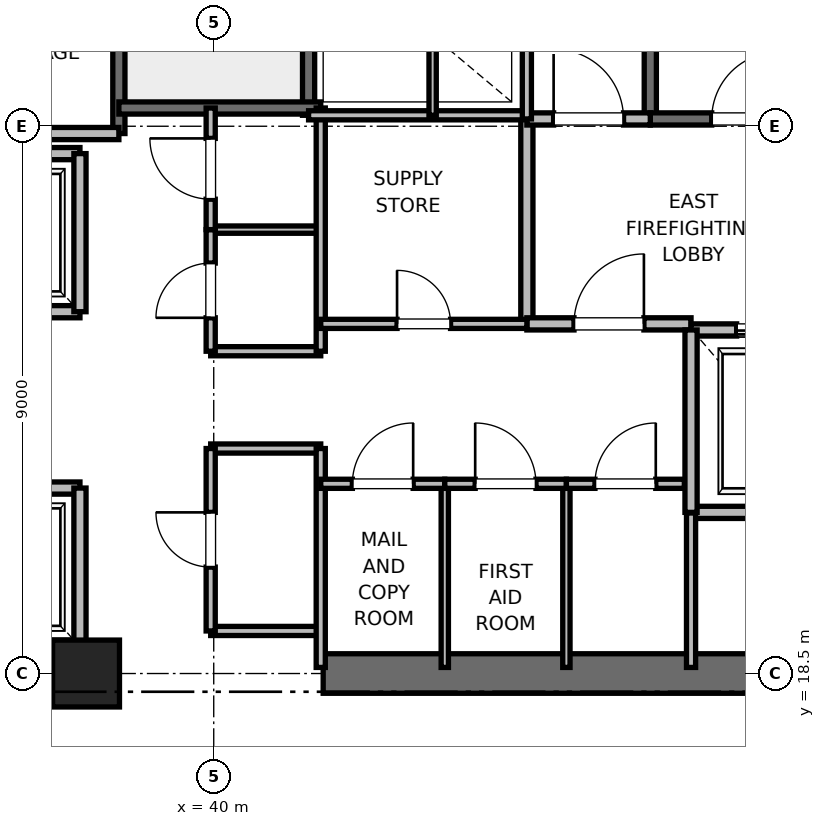
"""IFC4 building model, lengths in metres.
Left out: names, types, materials, properties, quantities, classifications, styles, units other than length and angle.
Written with IfcOpenShell. Run it as: python <this file> out.ifc"""

import sys

from ifc_helpers import new_model, si_unit, direction, frame, frame_2d, origin, origin_2d, place, context, subcontext, project, spatial, rectangle, extrude, element, fill, save


model = new_model("IFC4")
c1 = context("Model", 3, precision=1e-05, world=origin(), true_north=direction((0.0, 1.0)))
c2 = subcontext(c1, "Body", "Model", "MODEL_VIEW")
j1 = project(units=[si_unit("LENGTHUNIT", "METRE"), si_unit("PLANEANGLEUNIT", "RADIAN")], contexts=[c1])
p1 = place(None, origin())
s1 = spatial("IfcSite", under=j1, at=p1, CompositionType="ELEMENT")
p2 = place(p1, origin())
s2 = spatial("IfcBuilding", under=s1, at=p2, CompositionType="ELEMENT")
p3 = place(p2, frame((0.0, 0.0, 87.6)))
s3 = spatial("IfcBuildingStorey", under=s2, at=p3, CompositionType="ELEMENT", Elevation=87.6)
p4 = place(p3, frame((37.9, 18.5, 0.0), z_axis=(0.0, 0.0, 1.0), x_axis=(1.0, 0.0, 0.0)))
e1 = element("IfcColumn", 1, at=p4, inside=s3, PredefinedType="PILASTER", context=c2, shape_type="SweptSolid", body=[
    extrude(rectangle(XDim=1.1, YDim=1.1, at=origin_2d()), origin(), (0.0, 0.0, 1.0), 4.0),
])
for number, where, z_axis, x_axis in (
    (2, (29.0, 18.5, 0.0), (0.0, 0.0, 1.0), (1.0, 0.0, 0.0)),
    (3, (41.8, 18.5, 0.0), (0.0, 0.0, 1.0), (1.0, 0.0, 0.0)),
):
    element("IfcWall", number, at=place(p3, frame(where, z_axis=z_axis, x_axis=x_axis)), inside=s3, PredefinedType="SHEAR", context=c2, shape_type="SweptSolid", body=[
        extrude(rectangle(XDim=9.2, YDim=0.65, at=frame_2d((4.6, 0.0))), origin(), (0.0, 0.0, 1.0), 3.76),
    ])
p5 = place(p3, frame((47.18, 27.62, 0.0), z_axis=(0.0, 0.0, 1.0), x_axis=(0.0, 1.0, 0.0)))
e4 = element("IfcWall", 4, at=p5, inside=s3, PredefinedType="SOLIDWALL", context=c2, shape_type="SweptSolid", body=[
    extrude(rectangle(XDim=8.18, YDim=0.2, at=frame_2d((4.09, 0.0))), origin(), (0.0, 0.0, 1.0), 3.76),
])
p6 = place(p3, frame((47.18, 27.62, 0.0), z_axis=(0.0, 0.0, 1.0), x_axis=(1.0, 0.0, 0.0)))
e5 = element("IfcWall", 5, at=p6, inside=s3, PredefinedType="SOLIDWALL", context=c2, shape_type="SweptSolid", body=[
    extrude(rectangle(XDim=3.12, YDim=0.2, at=frame_2d((1.56, 0.0))), origin(), (0.0, 0.0, 1.0), 3.76),
])
p7 = place(p6, frame((1.01, 0.0, 0.0)))
e6 = element("IfcOpeningElement", 6, at=p7, cuts=e5, PredefinedType="OPENING", context=c2, shape_type="SweptSolid", body=[
    extrude(rectangle(XDim=1.1, YDim=2.15, at=frame_2d((0.55, 1.075))), frame((0.0, 0.1, 0.0), z_axis=(0.0, -1.0, 0.0), x_axis=(1.0, 0.0, 0.0)), (0.0, 0.0, 1.0), 0.2),
])
p8 = place(p3, frame((38.44, 27.38, 0.0), z_axis=(0.0, 0.0, 1.0), x_axis=(0.0, 1.0, 0.0)))
e7 = element("IfcWall", 7, at=p8, inside=s3, PredefinedType="SOLIDWALL", context=c2, shape_type="SweptSolid", body=[
    extrude(rectangle(XDim=8.87, YDim=0.2, at=frame_2d((4.435, 0.0))), origin(), (0.0, 0.0, 1.0), 3.76),
])
p9 = place(p3, frame((41.56, 27.68, 0.0), z_axis=(0.0, 0.0, 1.0), x_axis=(0.0, 1.0, 0.0)))
e8 = element("IfcWall", 8, at=p9, inside=s3, PredefinedType="SOLIDWALL", context=c2, shape_type="SweptSolid", body=[
    extrude(rectangle(XDim=8.57, YDim=0.2, at=frame_2d((4.285, 0.0))), origin(), (0.0, 0.0, 1.0), 3.76),
])
p10 = place(p3, frame((38.44, 27.8, 0.0), z_axis=(0.0, 0.0, 1.0), x_axis=(1.0, 0.0, 0.0)))
e9 = element("IfcWall", 9, at=p10, inside=s3, PredefinedType="SOLIDWALL", context=c2, shape_type="SweptSolid", body=[
    extrude(rectangle(XDim=3.32, YDim=0.2, at=frame_2d((1.66, 0.0))), origin(), (0.0, 0.0, 1.0), 3.76),
])
p11 = place(p3, frame((32.82, 27.38, 0.0), z_axis=(0.0, 0.0, 1.0), x_axis=(1.0, 0.0, 0.0)))
e10 = element("IfcWall", 10, at=p11, inside=s3, PredefinedType="PARTITIONING", context=c2, shape_type="SweptSolid", body=[
    extrude(rectangle(XDim=5.62, YDim=0.2, at=frame_2d((2.81, 0.0))), origin(), (0.0, 0.0, 1.0), 3.76),
])
p12 = place(p3, frame((45.15, 24.25, 0.0), z_axis=(0.0, 0.0, 1.0), x_axis=(0.0, 1.0, 0.0)))
e11 = element("IfcWall", 11, at=p12, inside=s3, PredefinedType="PARTITIONING", context=c2, shape_type="SweptSolid", body=[
    extrude(rectangle(XDim=3.37, YDim=0.2, at=frame_2d((1.685, 0.0))), origin(), (0.0, 0.0, 1.0), 3.76),
])
p13 = place(p3, frame((45.15, 24.25, 0.0), z_axis=(0.0, 0.0, 1.0), x_axis=(1.0, 0.0, 0.0)))
e12 = element("IfcWall", 12, at=p13, inside=s3, PredefinedType="PARTITIONING", context=c2, shape_type="SweptSolid", body=[
    extrude(rectangle(XDim=2.7, YDim=0.2, at=frame_2d((1.35, 0.0))), origin(), (0.0, 0.0, 1.0), 3.76),
])
p14 = place(p13, frame((0.775, 0.0, 0.0)))
e13 = element("IfcOpeningElement", 13, at=p14, cuts=e12, PredefinedType="OPENING", context=c2, shape_type="SweptSolid", body=[
    extrude(rectangle(XDim=1.15, YDim=2.2, at=frame_2d((0.575, 1.1))), frame((0.0, 0.1, 0.0), z_axis=(0.0, -1.0, 0.0), x_axis=(1.0, 0.0, 0.0)), (0.0, 0.0, 1.0), 0.2),
])
p15 = place(p3, frame((45.15, 27.62, 0.0), z_axis=(0.0, 0.0, 1.0), x_axis=(1.0, 0.0, 0.0)))
e14 = element("IfcWall", 14, at=p15, inside=s3, PredefinedType="PARTITIONING", context=c2, shape_type="SweptSolid", body=[
    extrude(rectangle(XDim=2.03, YDim=0.2, at=frame_2d((1.015, 0.0))), origin(), (0.0, 0.0, 1.0), 3.76),
])
p16 = place(p15, frame((0.44, 0.0, 0.0)))
e15 = element("IfcOpeningElement", 15, at=p16, cuts=e14, PredefinedType="OPENING", context=c2, shape_type="SweptSolid", body=[
    extrude(rectangle(XDim=1.15, YDim=2.2, at=frame_2d((0.575, 1.1))), frame((0.0, 0.1, 0.0), z_axis=(0.0, -1.0, 0.0), x_axis=(1.0, 0.0, 0.0)), (0.0, 0.0, 1.0), 0.2),
])
p17 = place(p3, frame((47.85, 21.15, 0.0), z_axis=(0.0, 0.0, 1.0), x_axis=(1.0, 0.0, 0.0)))
e16 = element("IfcWall", 16, at=p17, inside=s3, PredefinedType="SOLIDWALL", context=c2, shape_type="SweptSolid", body=[
    extrude(rectangle(XDim=2.6, YDim=0.2, at=frame_2d((1.3, 0.0))), origin(), (0.0, 0.0, 1.0), 3.76),
])
p18 = place(p3, frame((50.45, 24.15, 0.0), z_axis=(0.0, 0.0, 1.0), x_axis=(-1.0, 0.0, 0.0)))
e17 = element("IfcWall", 17, at=p18, inside=s3, PredefinedType="SOLIDWALL", context=c2, shape_type="SweptSolid", body=[
    extrude(rectangle(XDim=2.6, YDim=0.2, at=frame_2d((1.3, 0.0))), origin(), (0.0, 0.0, 1.0), 2.54),
])
p19 = place(p18, frame((0.75, 0.0, 0.0)))
e18 = element("IfcOpeningElement", 18, at=p19, cuts=e17, PredefinedType="OPENING", context=c2, shape_type="SweptSolid", body=[
    extrude(rectangle(XDim=1.1, YDim=2.2, at=frame_2d((0.55, 1.1))), frame((0.0, 0.1, 0.0), z_axis=(0.0, -1.0, 0.0), x_axis=(1.0, 0.0, 0.0)), (0.0, 0.0, 1.0), 0.2),
])
p20 = place(p3, frame((47.85, 24.15, 0.0), z_axis=(0.0, 0.0, 1.0), x_axis=(0.0, -1.0, 0.0)))
e19 = element("IfcWall", 19, at=p20, inside=s3, PredefinedType="SOLIDWALL", context=c2, shape_type="SweptSolid", body=[
    extrude(rectangle(XDim=3.0, YDim=0.2, at=frame_2d((1.5, 0.0))), origin(), (0.0, 0.0, 1.0), 3.76),
])
p21 = place(p3, frame((35.5, 18.95, 0.0), z_axis=(0.0, 0.0, 1.0), x_axis=(1.0, 0.0, 0.0)))
e20 = element("IfcWall", 20, at=p21, inside=s3, PredefinedType="SOLIDWALL", context=c2, shape_type="SweptSolid", body=[
    extrude(rectangle(XDim=2.3, YDim=0.2, at=frame_2d((1.15, 0.0))), origin(), (0.0, 0.0, 1.0), 2.54),
])
p22 = place(p3, frame((37.8, 21.55, 0.0), z_axis=(0.0, 0.0, 1.0), x_axis=(-1.0, 0.0, 0.0)))
e21 = element("IfcWall", 21, at=p22, inside=s3, PredefinedType="SOLIDWALL", context=c2, shape_type="SweptSolid", body=[
    extrude(rectangle(XDim=2.3, YDim=0.2, at=frame_2d((1.15, 0.0))), origin(), (0.0, 0.0, 1.0), 3.76),
])
p23 = place(p22, frame((0.6, 0.0, 0.0)))
e22 = element("IfcOpeningElement", 22, at=p23, cuts=e21, PredefinedType="OPENING", context=c2, shape_type="SweptSolid", body=[
    extrude(rectangle(XDim=1.1, YDim=2.2, at=frame_2d((0.55, 1.1))), frame((0.0, 0.1, 0.0), z_axis=(0.0, -1.0, 0.0), x_axis=(1.0, 0.0, 0.0)), (0.0, 0.0, 1.0), 0.2),
])
p24 = place(p3, frame((37.8, 18.95, 0.0), z_axis=(0.0, 0.0, 1.0), x_axis=(0.0, 1.0, 0.0)))
e23 = element("IfcWall", 23, at=p24, inside=s3, PredefinedType="SOLIDWALL", context=c2, shape_type="SweptSolid", body=[
    extrude(rectangle(XDim=2.6, YDim=0.2, at=frame_2d((1.3, 0.0))), origin(), (0.0, 0.0, 1.0), 2.54),
])
p25 = place(p3, frame((35.5, 24.45, 0.0), z_axis=(0.0, 0.0, 1.0), x_axis=(1.0, 0.0, 0.0)))
e24 = element("IfcWall", 24, at=p25, inside=s3, PredefinedType="SOLIDWALL", context=c2, shape_type="SweptSolid", body=[
    extrude(rectangle(XDim=2.3, YDim=0.2, at=frame_2d((1.15, 0.0))), origin(), (0.0, 0.0, 1.0), 3.76),
])
p26 = place(p25, frame((0.6, 0.0, 0.0)))
e25 = element("IfcOpeningElement", 25, at=p26, cuts=e24, PredefinedType="OPENING", context=c2, shape_type="SweptSolid", body=[
    extrude(rectangle(XDim=1.1, YDim=2.2, at=frame_2d((0.55, 1.1))), frame((0.0, 0.1, 0.0), z_axis=(0.0, -1.0, 0.0), x_axis=(1.0, 0.0, 0.0)), (0.0, 0.0, 1.0), 0.2),
])
p27 = place(p3, frame((37.8, 27.05, 0.0), z_axis=(0.0, 0.0, 1.0), x_axis=(-1.0, 0.0, 0.0)))
e26 = element("IfcWall", 26, at=p27, inside=s3, PredefinedType="SOLIDWALL", context=c2, shape_type="SweptSolid", body=[
    extrude(rectangle(XDim=2.3, YDim=0.2, at=frame_2d((1.15, 0.0))), origin(), (0.0, 0.0, 1.0), 3.76),
])
p28 = place(p3, frame((37.8, 24.45, 0.0), z_axis=(0.0, 0.0, 1.0), x_axis=(0.0, 1.0, 0.0)))
e27 = element("IfcWall", 27, at=p28, inside=s3, PredefinedType="SOLIDWALL", context=c2, shape_type="SweptSolid", body=[
    extrude(rectangle(XDim=2.6, YDim=0.2, at=frame_2d((1.3, 0.0))), origin(), (0.0, 0.0, 1.0), 3.76),
])
for number, where, z_axis, x_axis in (
    (28, (39.95, 19.2, 0.0), (0.0, 0.0, 1.0), (1.0, 0.0, 0.0)),
    (29, (39.95, 22.2, 0.0), (0.0, 0.0, 1.0), (1.0, 0.0, 0.0)),
    (30, (39.95, 23.8, 0.0), (0.0, 0.0, 1.0), (1.0, 0.0, 0.0)),
):
    element("IfcWall", number, at=place(p3, frame(where, z_axis=z_axis, x_axis=x_axis)), inside=s3, PredefinedType="PARTITIONING", context=c2, shape_type="SweptSolid", body=[
        extrude(rectangle(XDim=1.81, YDim=0.15, at=frame_2d((0.905, 0.0))), origin(), (0.0, 0.0, 1.0), 2.85),
    ])
p29 = place(p3, frame((39.95, 25.8, 0.0), z_axis=(0.0, 0.0, 1.0), x_axis=(1.0, 0.0, 0.0)))
e31 = element("IfcWall", 31, at=p29, inside=s3, PredefinedType="PARTITIONING", context=c2, shape_type="SweptSolid", body=[
    extrude(rectangle(XDim=1.81, YDim=0.12, at=frame_2d((0.905, 0.0))), origin(), (0.0, 0.0, 1.0), 2.85),
])
p30 = place(p3, frame((41.76, 18.6, 0.0), z_axis=(0.0, 0.0, 1.0), x_axis=(0.0, 1.0, 0.0)))
e32 = element("IfcWall", 32, at=p30, inside=s3, PredefinedType="PARTITIONING", context=c2, shape_type="SweptSolid", body=[
    extrude(rectangle(XDim=3.6, YDim=0.15, at=frame_2d((1.8, 0.0))), origin(), (0.0, 0.0, 1.0), 2.54),
])
p31 = place(p3, frame((41.76, 23.8, 0.0), z_axis=(0.0, 0.0, 1.0), x_axis=(0.0, 1.0, 0.0)))
e33 = element("IfcWall", 33, at=p31, inside=s3, PredefinedType="PARTITIONING", context=c2, shape_type="SweptSolid", body=[
    extrude(rectangle(XDim=4.0, YDim=0.15, at=frame_2d((2.0, 0.0))), origin(), (0.0, 0.0, 1.0), 2.85),
])
p32 = place(p3, frame((39.95, 19.2, 0.0), z_axis=(0.0, 0.0, 1.0), x_axis=(0.0, 1.0, 0.0)))
e34 = element("IfcWall", 34, at=p32, inside=s3, PredefinedType="PARTITIONING", context=c2, shape_type="SweptSolid", body=[
    extrude(rectangle(XDim=3.0, YDim=0.15, at=frame_2d((1.5, 0.0))), origin(), (0.0, 0.0, 1.0), 2.85),
])
p33 = place(p32, frame((1.05, 0.0, 0.0)))
e35 = element("IfcOpeningElement", 35, at=p33, cuts=e34, PredefinedType="OPENING", context=c2, shape_type="SweptSolid", body=[
    extrude(rectangle(XDim=0.9, YDim=2.1, at=frame_2d((0.45, 1.05))), frame((0.0, 0.075, 0.0), z_axis=(0.0, -1.0, 0.0), x_axis=(1.0, 0.0, 0.0)), (0.0, 0.0, 1.0), 0.15),
])
p34 = place(p3, frame((39.95, 23.8, 0.0), z_axis=(0.0, 0.0, 1.0), x_axis=(0.0, 1.0, 0.0)))
e36 = element("IfcWall", 36, at=p34, inside=s3, PredefinedType="PARTITIONING", context=c2, shape_type="SweptSolid", body=[
    extrude(rectangle(XDim=2.0, YDim=0.15, at=frame_2d((1.0, 0.0))), origin(), (0.0, 0.0, 1.0), 2.85),
])
p35 = place(p34, frame((0.55, 0.0, 0.0)))
e37 = element("IfcOpeningElement", 37, at=p35, cuts=e36, PredefinedType="OPENING", context=c2, shape_type="SweptSolid", body=[
    extrude(rectangle(XDim=0.9, YDim=2.1, at=frame_2d((0.45, 1.05))), frame((0.0, 0.075, 0.0), z_axis=(0.0, -1.0, 0.0), x_axis=(1.0, 0.0, 0.0)), (0.0, 0.0, 1.0), 0.15),
])
p36 = place(p3, frame((39.95, 25.8, 0.0), z_axis=(0.0, 0.0, 1.0), x_axis=(0.0, 1.0, 0.0)))
e38 = element("IfcWall", 38, at=p36, inside=s3, PredefinedType="PARTITIONING", context=c2, shape_type="SweptSolid", body=[
    extrude(rectangle(XDim=2.0, YDim=0.15, at=frame_2d((1.0, 0.0))), origin(), (0.0, 0.0, 1.0), 2.85),
])
p37 = place(p36, frame((0.5, 0.0, 0.0)))
e39 = element("IfcOpeningElement", 39, at=p37, cuts=e38, PredefinedType="OPENING", context=c2, shape_type="SweptSolid", body=[
    extrude(rectangle(XDim=1.0, YDim=2.15, at=frame_2d((0.5, 1.075))), frame((0.0, 0.075, 0.0), z_axis=(0.0, -1.0, 0.0), x_axis=(1.0, 0.0, 0.0)), (0.0, 0.0, 1.0), 0.15),
])
p38 = place(p3, frame((41.56, 27.68, 0.0), z_axis=(0.0, 0.0, 1.0), x_axis=(1.0, 0.0, 0.0)))
e40 = element("IfcWall", 40, at=p38, inside=s3, PredefinedType="PARTITIONING", context=c2, shape_type="SweptSolid", body=[
    extrude(rectangle(XDim=3.59, YDim=0.15, at=frame_2d((1.795, 0.0))), origin(), (0.0, 0.0, 1.0), 2.85),
])
p39 = place(p3, frame((47.85, 18.6, 0.0), z_axis=(0.0, 0.0, 1.0), x_axis=(0.0, 1.0, 0.0)))
e41 = element("IfcWall", 41, at=p39, inside=s3, PredefinedType="PARTITIONING", context=c2, shape_type="SweptSolid", body=[
    extrude(rectangle(XDim=2.54, YDim=0.15, at=frame_2d((1.27, 0.0))), origin(), (0.0, 0.0, 1.0), 2.85),
])
for number, where, z_axis, x_axis in (
    (42, (43.8, 18.6, 0.0), (0.0, 0.0, 1.0), (0.0, 1.0, 0.0)),
    (43, (45.8, 18.6, 0.0), (0.0, 0.0, 1.0), (0.0, 1.0, 0.0)),
):
    element("IfcWall", number, at=place(p3, frame(where, z_axis=z_axis, x_axis=x_axis)), inside=s3, PredefinedType="PARTITIONING", context=c2, shape_type="SweptSolid", body=[
        extrude(rectangle(XDim=3.02, YDim=0.12, at=frame_2d((1.51, 0.0))), origin(), (0.0, 0.0, 1.0), 2.85),
    ])
p40 = place(p3, frame((41.76, 21.62, 0.0), z_axis=(0.0, 0.0, 1.0), x_axis=(1.0, 0.0, 0.0)))
e44 = element("IfcWall", 44, at=p40, inside=s3, PredefinedType="PARTITIONING", context=c2, shape_type="SweptSolid", body=[
    extrude(rectangle(XDim=2.04, YDim=0.15, at=frame_2d((1.02, 0.0))), origin(), (0.0, 0.0, 1.0), 2.85),
])
p41 = place(p40, frame((0.52, 0.0, 0.0)))
e45 = element("IfcOpeningElement", 45, at=p41, cuts=e44, PredefinedType="OPENING", context=c2, shape_type="SweptSolid", body=[
    extrude(rectangle(XDim=1.0, YDim=2.15, at=frame_2d((0.5, 1.075))), frame((0.0, 0.075, 0.0), z_axis=(0.0, -1.0, 0.0), x_axis=(1.0, 0.0, 0.0)), (0.0, 0.0, 1.0), 0.15),
])
p42 = place(p3, frame((43.8, 21.62, 0.0), z_axis=(0.0, 0.0, 1.0), x_axis=(1.0, 0.0, 0.0)))
e46 = element("IfcWall", 46, at=p42, inside=s3, PredefinedType="PARTITIONING", context=c2, shape_type="SweptSolid", body=[
    extrude(rectangle(XDim=2.0, YDim=0.15, at=frame_2d((1.0, 0.0))), origin(), (0.0, 0.0, 1.0), 2.85),
])
p43 = place(p42, frame((0.5, 0.0, 0.0)))
e47 = element("IfcOpeningElement", 47, at=p43, cuts=e46, PredefinedType="OPENING", context=c2, shape_type="SweptSolid", body=[
    extrude(rectangle(XDim=1.0, YDim=2.15, at=frame_2d((0.5, 1.075))), frame((0.0, 0.075, 0.0), z_axis=(0.0, -1.0, 0.0), x_axis=(1.0, 0.0, 0.0)), (0.0, 0.0, 1.0), 0.15),
])
p44 = place(p3, frame((45.8, 21.62, 0.0), z_axis=(0.0, 0.0, 1.0), x_axis=(1.0, 0.0, 0.0)))
e48 = element("IfcWall", 48, at=p44, inside=s3, PredefinedType="PARTITIONING", context=c2, shape_type="SweptSolid", body=[
    extrude(rectangle(XDim=1.94, YDim=0.15, at=frame_2d((0.97, 0.0))), origin(), (0.0, 0.0, 1.0), 2.85),
])
p45 = place(p44, frame((0.47, 0.0, 0.0)))
e49 = element("IfcOpeningElement", 49, at=p45, cuts=e48, PredefinedType="OPENING", context=c2, shape_type="SweptSolid", body=[
    extrude(rectangle(XDim=1.0, YDim=2.15, at=frame_2d((0.5, 1.075))), frame((0.0, 0.075, 0.0), z_axis=(0.0, -1.0, 0.0), x_axis=(1.0, 0.0, 0.0)), (0.0, 0.0, 1.0), 0.15),
])
p46 = place(p3, frame((41.76, 24.25, 0.0), z_axis=(0.0, 0.0, 1.0), x_axis=(1.0, 0.0, 0.0)))
e50 = element("IfcWall", 50, at=p46, inside=s3, PredefinedType="PARTITIONING", context=c2, shape_type="SweptSolid", body=[
    extrude(rectangle(XDim=3.39, YDim=0.15, at=frame_2d((1.695, 0.0))), origin(), (0.0, 0.0, 1.0), 2.85),
])
p47 = place(p46, frame((1.255, 0.0, 0.0)))
e51 = element("IfcOpeningElement", 51, at=p47, cuts=e50, PredefinedType="OPENING", context=c2, shape_type="SweptSolid", body=[
    extrude(rectangle(XDim=0.88, YDim=2.1, at=frame_2d((0.44, 1.05))), frame((0.0, 0.075, 0.0), z_axis=(0.0, -1.0, 0.0), x_axis=(1.0, 0.0, 0.0)), (0.0, 0.0, 1.0), 0.15),
])
p48 = place(p3, frame((45.15, 27.62, 0.0), z_axis=(0.0, 0.0, 1.0), x_axis=(0.0, 1.0, 0.0)))
e52 = element("IfcWall", 52, at=p48, inside=s3, PredefinedType="PARTITIONING", context=c2, shape_type="SweptSolid", body=[
    extrude(rectangle(XDim=3.1, YDim=0.15, at=frame_2d((1.55, 0.0))), origin(), (0.0, 0.0, 1.0), 2.85),
])
p49 = place(p3, frame((43.6, 27.68, 0.0), z_axis=(0.0, 0.0, 1.0), x_axis=(0.0, 1.0, 0.0)))
e53 = element("IfcWall", 53, at=p49, inside=s3, PredefinedType="PARTITIONING", context=c2, shape_type="SweptSolid", body=[
    extrude(rectangle(XDim=3.04, YDim=0.12, at=frame_2d((1.52, 0.0))), origin(), (0.0, 0.0, 1.0), 2.85),
])
p50 = place(p7, origin())
e54 = element("IfcDoor", 54, at=p50, inside=s3, OperationType="SINGLE_SWING_RIGHT", PredefinedType="DOOR", context=c2, shape_type="SweptSolid", body=[
    extrude(rectangle(XDim=1.1, YDim=2.15, at=frame_2d((0.55, 1.075))), frame((0.0, 0.025, 0.0), z_axis=(0.0, -1.0, 0.0), x_axis=(1.0, 0.0, 0.0)), (0.0, 0.0, 1.0), 0.05),
])
fill(e6, e54)
p51 = place(p14, origin())
e55 = element("IfcDoor", 55, at=p51, inside=s3, OperationType="SINGLE_SWING_RIGHT", PredefinedType="DOOR", context=c2, shape_type="SweptSolid", body=[
    extrude(rectangle(XDim=1.15, YDim=2.2, at=frame_2d((0.575, 1.1))), frame((0.0, 0.025, 0.0), z_axis=(0.0, -1.0, 0.0), x_axis=(1.0, 0.0, 0.0)), (0.0, 0.0, 1.0), 0.05),
])
fill(e13, e55)
p52 = place(p16, origin())
e56 = element("IfcDoor", 56, at=p52, inside=s3, OperationType="SINGLE_SWING_LEFT", PredefinedType="DOOR", context=c2, shape_type="SweptSolid", body=[
    extrude(rectangle(XDim=1.15, YDim=2.2, at=frame_2d((0.575, 1.1))), frame((0.0, 0.025, 0.0), z_axis=(0.0, -1.0, 0.0), x_axis=(1.0, 0.0, 0.0)), (0.0, 0.0, 1.0), 0.05),
])
fill(e15, e56)
p53 = place(p19, origin())
e57 = element("IfcDoor", 57, at=p53, inside=s3, OperationType="SLIDING_TO_RIGHT", PredefinedType="DOOR", context=c2, shape_type="SweptSolid", body=[
    extrude(rectangle(XDim=1.1, YDim=2.2, at=frame_2d((0.55, 1.1))), frame((0.0, 0.025, 0.0), z_axis=(0.0, -1.0, 0.0), x_axis=(1.0, 0.0, 0.0)), (0.0, 0.0, 1.0), 0.05),
])
fill(e18, e57)
p54 = place(p33, origin())
e58 = element("IfcDoor", 58, at=p54, inside=s3, OperationType="SINGLE_SWING_RIGHT", PredefinedType="DOOR", context=c2, shape_type="SweptSolid", body=[
    extrude(rectangle(XDim=0.9, YDim=2.1, at=frame_2d((0.45, 1.05))), frame((0.0, 0.025, 0.0), z_axis=(0.0, -1.0, 0.0), x_axis=(1.0, 0.0, 0.0)), (0.0, 0.0, 1.0), 0.05),
])
fill(e35, e58)
p55 = place(p35, origin())
e59 = element("IfcDoor", 59, at=p55, inside=s3, OperationType="SINGLE_SWING_LEFT", PredefinedType="DOOR", context=c2, shape_type="SweptSolid", body=[
    extrude(rectangle(XDim=0.9, YDim=2.1, at=frame_2d((0.45, 1.05))), frame((0.0, 0.025, 0.0), z_axis=(0.0, -1.0, 0.0), x_axis=(1.0, 0.0, 0.0)), (0.0, 0.0, 1.0), 0.05),
])
fill(e37, e59)
p56 = place(p37, origin())
e60 = element("IfcDoor", 60, at=p56, inside=s3, OperationType="SINGLE_SWING_RIGHT", PredefinedType="DOOR", context=c2, shape_type="SweptSolid", body=[
    extrude(rectangle(XDim=1.0, YDim=2.15, at=frame_2d((0.5, 1.075))), frame((0.0, 0.025, 0.0), z_axis=(0.0, -1.0, 0.0), x_axis=(1.0, 0.0, 0.0)), (0.0, 0.0, 1.0), 0.05),
])
fill(e39, e60)
p57 = place(p41, origin())
e61 = element("IfcDoor", 61, at=p57, inside=s3, OperationType="SINGLE_SWING_RIGHT", PredefinedType="DOOR", context=c2, shape_type="SweptSolid", body=[
    extrude(rectangle(XDim=1.0, YDim=2.15, at=frame_2d((0.5, 1.075))), frame((0.0, 0.025, 0.0), z_axis=(0.0, -1.0, 0.0), x_axis=(1.0, 0.0, 0.0)), (0.0, 0.0, 1.0), 0.05),
])
fill(e45, e61)
p58 = place(p43, origin())
e62 = element("IfcDoor", 62, at=p58, inside=s3, OperationType="SINGLE_SWING_LEFT", PredefinedType="DOOR", context=c2, shape_type="SweptSolid", body=[
    extrude(rectangle(XDim=1.0, YDim=2.15, at=frame_2d((0.5, 1.075))), frame((0.0, 0.025, 0.0), z_axis=(0.0, -1.0, 0.0), x_axis=(1.0, 0.0, 0.0)), (0.0, 0.0, 1.0), 0.05),
])
fill(e47, e62)
p59 = place(p45, origin())
e63 = element("IfcDoor", 63, at=p59, inside=s3, OperationType="SINGLE_SWING_RIGHT", PredefinedType="DOOR", context=c2, shape_type="SweptSolid", body=[
    extrude(rectangle(XDim=1.0, YDim=2.15, at=frame_2d((0.5, 1.075))), frame((0.0, 0.025, 0.0), z_axis=(0.0, -1.0, 0.0), x_axis=(1.0, 0.0, 0.0)), (0.0, 0.0, 1.0), 0.05),
])
fill(e49, e63)
p60 = place(p47, origin())
e64 = element("IfcDoor", 64, at=p60, inside=s3, OperationType="SINGLE_SWING_LEFT", PredefinedType="DOOR", context=c2, shape_type="SweptSolid", body=[
    extrude(rectangle(XDim=0.88, YDim=2.1, at=frame_2d((0.44, 1.05))), frame((0.0, 0.025, 0.0), z_axis=(0.0, -1.0, 0.0), x_axis=(1.0, 0.0, 0.0)), (0.0, 0.0, 1.0), 0.05),
])
fill(e51, e64)
save(model, sys.argv[1])
